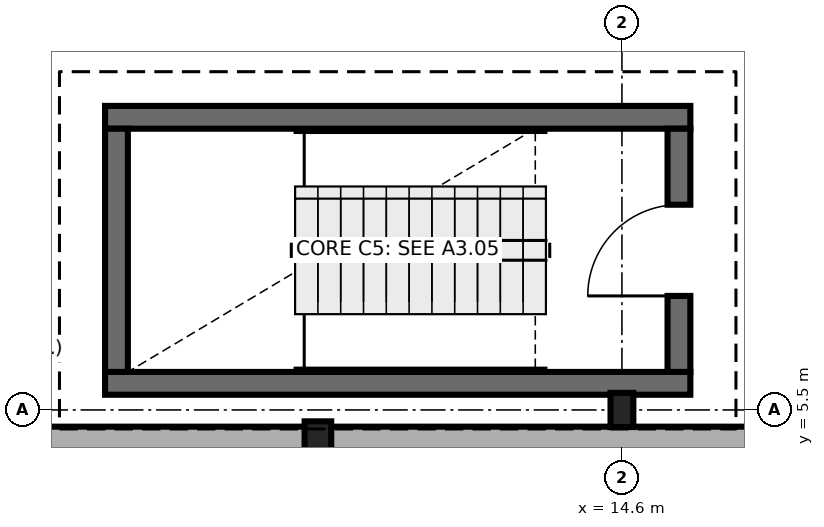
"""IFC4 building model, lengths in metres.
Left out: names, types, materials, properties, quantities, classifications, styles, units other than length and angle.
Written with IfcOpenShell. Run it as: python <this file> out.ifc"""

import sys

from ifc_helpers import new_model, si_unit, direction, frame, frame_2d, origin, origin_2d, place, context, subcontext, project, spatial, rectangle, i_section, extrude, element, fill, save


model = new_model("IFC4")
c1 = context("Model", 3, precision=1e-05, world=origin(), true_north=direction((0.0, 1.0)))
c2 = subcontext(c1, "Body", "Model", "MODEL_VIEW")
j1 = project(units=[si_unit("LENGTHUNIT", "METRE"), si_unit("PLANEANGLEUNIT", "RADIAN")], contexts=[c1])
p1 = place(None, origin())
s1 = spatial("IfcSite", under=j1, at=p1, CompositionType="ELEMENT")
p2 = place(p1, origin())
s2 = spatial("IfcBuilding", under=s1, at=p2, CompositionType="ELEMENT")
p3 = place(p2, frame((0.0, 0.0, 4.8)))
s3 = spatial("IfcBuildingStorey", under=s2, at=p3, CompositionType="ELEMENT", Elevation=4.8)
p4 = place(p3, frame((10.6, 5.05, 0.0), z_axis=(0.0, 0.0, 1.0), x_axis=(1.0, 0.0, 0.0)))
e1 = element("IfcColumn", 1, at=p4, inside=s3, PredefinedType="PILASTER", context=c2, shape_type="SweptSolid", body=[
    extrude(rectangle(XDim=0.35, YDim=0.6, at=origin_2d()), origin(), (0.0, 0.0, 1.0), 4.5),
])
p5 = place(p3, frame((14.6, 5.5, 0.0), z_axis=(0.0, 0.0, 1.0), x_axis=(1.0, 0.0, 0.0)))
e2 = element("IfcColumn", 2, at=p5, inside=s3, PredefinedType="COLUMN", context=c2, shape_type="SweptSolid", body=[
    extrude(i_section(OverallWidth=0.3, OverallDepth=0.45, WebThickness=0.014, FlangeThickness=0.026, FilletRadius=0.027, at=origin_2d()), origin(), (0.0, 0.0, 1.0), 4.5),
])
for number, where, z_axis, x_axis in (
    (3, (7.8, 5.85, 0.0), (0.0, 0.0, 1.0), (1.0, 0.0, 0.0)),
    (4, (15.5, 9.35, 0.0), (0.0, 0.0, 1.0), (-1.0, 0.0, 0.0)),
):
    element("IfcWall", number, at=place(p3, frame(where, z_axis=z_axis, x_axis=x_axis)), inside=s3, PredefinedType="SHEAR", context=c2, shape_type="SweptSolid", body=[
        extrude(rectangle(XDim=7.7, YDim=0.3, at=frame_2d((3.85, 0.0))), origin(), (0.0, 0.0, 1.0), 4.5),
    ])
p6 = place(p3, frame((7.95, 9.2, 0.0), z_axis=(0.0, 0.0, 1.0), x_axis=(0.0, -1.0, 0.0)))
e5 = element("IfcWall", 5, at=p6, inside=s3, PredefinedType="SHEAR", context=c2, shape_type="SweptSolid", body=[
    extrude(rectangle(XDim=3.2, YDim=0.3, at=frame_2d((1.6, 0.0))), origin(), (0.0, 0.0, 1.0), 4.5),
])
p7 = place(p3, frame((15.35, 6.0, 0.0), z_axis=(0.0, 0.0, 1.0), x_axis=(0.0, 1.0, 0.0)))
e6 = element("IfcWall", 6, at=p7, inside=s3, PredefinedType="SHEAR", context=c2, shape_type="SweptSolid", body=[
    extrude(rectangle(XDim=3.2, YDim=0.3, at=frame_2d((1.6, 0.0))), origin(), (0.0, 0.0, 1.0), 4.5),
])
p8 = place(p7, frame((1.0, 0.0, 0.0)))
e7 = element("IfcOpeningElement", 7, at=p8, cuts=e6, PredefinedType="OPENING", context=c2, shape_type="SweptSolid", body=[
    extrude(rectangle(XDim=1.2, YDim=2.15, at=frame_2d((0.6, 1.075))), frame((0.0, 0.16, 0.0), z_axis=(0.0, -1.0, 0.0), x_axis=(1.0, 0.0, 0.0)), (0.0, 0.0, 1.0), 0.32),
])
p9 = place(p3, frame((5.962, 5.09, 0.0), z_axis=(0.0, 0.0, 1.0), x_axis=(1.0, 0.0, 0.0)))
e8 = element("IfcWall", 8, at=p9, inside=s3, PredefinedType="SOLIDWALL", context=c2, shape_type="SweptSolid", body=[
    extrude(rectangle(XDim=48.176, YDim=0.38, at=frame_2d((24.088, 0.0))), origin(), (0.0, 0.0, 1.0), 4.25),
])
p10 = place(p9, frame((10.614, 0.0, 0.9)))
e9 = element("IfcOpeningElement", 9, at=p10, cuts=e8, PredefinedType="OPENING", context=c2, shape_type="SweptSolid", body=[
    extrude(rectangle(XDim=1.2, YDim=1.8, at=frame_2d((0.6, 0.9))), frame((0.0, 0.2, 0.0), z_axis=(0.0, -1.0, 0.0), x_axis=(1.0, 0.0, 0.0)), (0.0, 0.0, 1.0), 0.4),
])
p11 = place(p9, frame((13.308, 0.0, 0.9)))
e10 = element("IfcOpeningElement", 10, at=p11, cuts=e8, PredefinedType="OPENING", context=c2, shape_type="SweptSolid", body=[
    extrude(rectangle(XDim=1.5, YDim=2.1, at=frame_2d((0.75, 1.05))), frame((0.0, 0.2, 0.0), z_axis=(0.0, -1.0, 0.0), x_axis=(1.0, 0.0, 0.0)), (0.0, 0.0, 1.0), 0.4),
])
p12 = place(p9, frame((29.588, 0.0, 0.9)))
e11 = element("IfcOpeningElement", 11, at=p12, cuts=e8, PredefinedType="OPENING", context=c2, shape_type="SweptSolid", body=[
    extrude(rectangle(XDim=2.1, YDim=2.1, at=frame_2d((1.05, 1.05))), frame((0.0, 0.2, 0.0), z_axis=(0.0, -1.0, 0.0), x_axis=(1.0, 0.0, 0.0)), (0.0, 0.0, 1.0), 0.4),
])
p13 = place(p9, frame((33.288, 0.0, 0.9)))
e12 = element("IfcOpeningElement", 12, at=p13, cuts=e8, PredefinedType="OPENING", context=c2, shape_type="SweptSolid", body=[
    extrude(rectangle(XDim=2.7, YDim=2.1, at=frame_2d((1.35, 1.05))), frame((0.0, 0.2, 0.0), z_axis=(0.0, -1.0, 0.0), x_axis=(1.0, 0.0, 0.0)), (0.0, 0.0, 1.0), 0.4),
])
p14 = place(p9, frame((37.258, 0.0, 0.9)))
e13 = element("IfcOpeningElement", 13, at=p14, cuts=e8, PredefinedType="OPENING", context=c2, shape_type="SweptSolid", body=[
    extrude(rectangle(XDim=0.9, YDim=1.8, at=frame_2d((0.45, 0.9))), frame((0.0, 0.2, 0.0), z_axis=(0.0, -1.0, 0.0), x_axis=(1.0, 0.0, 0.0)), (0.0, 0.0, 1.0), 0.4),
])
p15 = place(p9, frame((39.018, 0.0, 0.9)))
e14 = element("IfcOpeningElement", 14, at=p15, cuts=e8, PredefinedType="OPENING", context=c2, shape_type="SweptSolid", body=[
    extrude(rectangle(XDim=0.9, YDim=1.8, at=frame_2d((0.45, 0.9))), frame((0.0, 0.2, 0.0), z_axis=(0.0, -1.0, 0.0), x_axis=(1.0, 0.0, 0.0)), (0.0, 0.0, 1.0), 0.4),
])
p16 = place(p9, frame((41.538, 0.0, 0.9)))
e15 = element("IfcOpeningElement", 15, at=p16, cuts=e8, PredefinedType="OPENING", context=c2, shape_type="SweptSolid", body=[
    extrude(rectangle(XDim=1.2, YDim=2.4, at=frame_2d((0.6, 1.2))), frame((0.0, 0.2, 0.0), z_axis=(0.0, -1.0, 0.0), x_axis=(1.0, 0.0, 0.0)), (0.0, 0.0, 1.0), 0.4),
])
p17 = place(p9, frame((44.538, 0.0, 0.9)))
e16 = element("IfcOpeningElement", 16, at=p17, cuts=e8, PredefinedType="OPENING", context=c2, shape_type="SweptSolid", body=[
    extrude(rectangle(XDim=1.2, YDim=1.8, at=frame_2d((0.6, 0.9))), frame((0.0, 0.2, 0.0), z_axis=(0.0, -1.0, 0.0), x_axis=(1.0, 0.0, 0.0)), (0.0, 0.0, 1.0), 0.4),
])
p18 = place(p8, origin())
e17 = element("IfcDoor", 17, at=p18, inside=s3, OperationType="SINGLE_SWING_LEFT", PredefinedType="DOOR", context=c2, shape_type="SweptSolid", body=[
    extrude(rectangle(XDim=1.2, YDim=2.15, at=frame_2d((0.6, 1.075))), frame((0.0, 0.025, 0.0), z_axis=(0.0, -1.0, 0.0), x_axis=(1.0, 0.0, 0.0)), (0.0, 0.0, 1.0), 0.05),
])
fill(e7, e17)
save(model, sys.argv[1])
